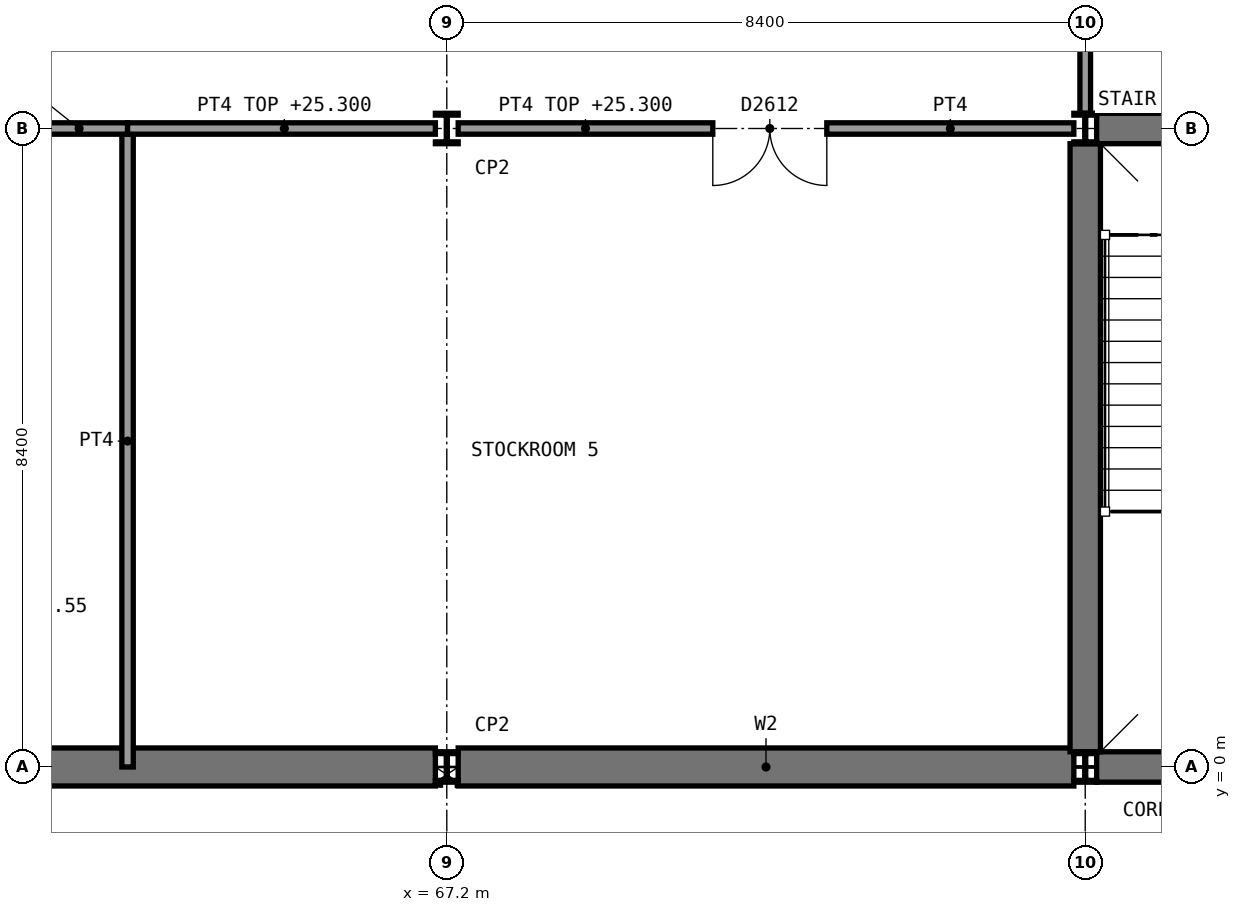
"""IFC4 building model, lengths in metres.
Left out: names, types, materials, properties, quantities, classifications, styles, units other than length and angle.
Written with IfcOpenShell. Run it as: python <this file> out.ifc"""

import sys

from ifc_helpers import new_model, si_unit, direction, frame, frame_2d, origin, origin_2d, place, context, subcontext, project, spatial, rectangle, i_section, extrude, element, fill, save


model = new_model("IFC4")
c1 = context("Model", 3, precision=1e-05, world=origin(), true_north=direction((0.0, 1.0)))
c2 = subcontext(c1, "Body", "Model", "MODEL_VIEW")
j1 = project(units=[si_unit("LENGTHUNIT", "METRE"), si_unit("PLANEANGLEUNIT", "RADIAN")], contexts=[c1])
p1 = place(None, origin())
s1 = spatial("IfcSite", under=j1, at=p1, CompositionType="ELEMENT")
p2 = place(p1, origin())
s2 = spatial("IfcBuilding", under=s1, at=p2, CompositionType="ELEMENT")
p3 = place(p2, frame((0.0, 0.0, 21.0)))
s3 = spatial("IfcBuildingStorey", under=s2, at=p3, CompositionType="ELEMENT", Elevation=21.0)
p4 = place(p3, frame((58.95, 0.0, 0.0), z_axis=(0.0, 0.0, 1.0), x_axis=(1.0, 0.0, 0.0)))
e1 = element("IfcWall", 1, at=p4, inside=s3, PredefinedType="SHEAR", context=c2, shape_type="SweptSolid", body=[
    extrude(rectangle(XDim=8.1, YDim=0.5, at=frame_2d((4.05, 0.0))), origin(), (0.0, 0.0, 1.0), 4.65),
])
p5 = place(p3, frame((67.35, 0.0, 0.0), z_axis=(0.0, 0.0, 1.0), x_axis=(1.0, 0.0, 0.0)))
e2 = element("IfcWall", 2, at=p5, inside=s3, PredefinedType="SHEAR", context=c2, shape_type="SweptSolid", body=[
    extrude(rectangle(XDim=8.1, YDim=0.5, at=frame_2d((4.05, 0.0))), origin(), (0.0, 0.0, 1.0), 4.65),
])
p6 = place(p3, frame((75.75, 0.0, 0.0), z_axis=(0.0, 0.0, 1.0), x_axis=(1.0, 0.0, 0.0)))
e3 = element("IfcWall", 3, at=p6, inside=s3, PredefinedType="SHEAR", context=c2, shape_type="SweptSolid", body=[
    extrude(rectangle(XDim=8.1, YDim=0.4, at=frame_2d((4.05, 0.0))), origin(), (0.0, 0.0, 1.0), 4.65),
])
p7 = place(p3, frame((75.75, 8.4, 0.0), z_axis=(0.0, 0.0, 1.0), x_axis=(1.0, 0.0, 0.0)))
e4 = element("IfcWall", 4, at=p7, inside=s3, PredefinedType="SHEAR", context=c2, shape_type="SweptSolid", body=[
    extrude(rectangle(XDim=8.1, YDim=0.4, at=frame_2d((4.05, 0.0))), origin(), (0.0, 0.0, 1.0), 4.65),
])
p8 = place(p7, frame((1.15, 0.0, 0.0)))
e5 = element("IfcOpeningElement", 5, at=p8, cuts=e4, PredefinedType="OPENING", context=c2, shape_type="SweptSolid", body=[
    extrude(rectangle(XDim=1.8, YDim=2.1, at=frame_2d((0.9, 1.05))), frame((0.0, 0.21, 0.0), z_axis=(0.0, -1.0, 0.0), x_axis=(1.0, 0.0, 0.0)), (0.0, 0.0, 1.0), 0.42),
])
p9 = place(p7, frame((5.3, 0.0, 0.0)))
e6 = element("IfcOpeningElement", 6, at=p9, cuts=e4, PredefinedType="OPENING", context=c2, shape_type="SweptSolid", body=[
    extrude(rectangle(XDim=1.8, YDim=2.1, at=frame_2d((0.9, 1.05))), frame((0.0, 0.21, 0.0), z_axis=(0.0, -1.0, 0.0), x_axis=(1.0, 0.0, 0.0)), (0.0, 0.0, 1.0), 0.42),
])
p10 = place(p3, frame((75.6, 0.2, 0.0), z_axis=(0.0, 0.0, 1.0), x_axis=(0.0, 1.0, 0.0)))
e7 = element("IfcWall", 7, at=p10, inside=s3, PredefinedType="SHEAR", context=c2, shape_type="SweptSolid", body=[
    extrude(rectangle(XDim=8.0, YDim=0.4, at=frame_2d((4.0, 0.0))), origin(), (0.0, 0.0, 1.0), 4.65),
])
for number, where, z_axis, x_axis in (
    (8, (67.2, 0.0, 0.0), (0.0, 0.0, 1.0), (1.0, 0.0, 0.0)),
    (9, (67.2, 8.4, 0.0), (0.0, 0.0, 1.0), (1.0, 0.0, 0.0)),
    (10, (75.6, 0.0, 0.0), (0.0, 0.0, 1.0), (1.0, 0.0, 0.0)),
    (11, (75.6, 8.4, 0.0), (0.0, 0.0, 1.0), (1.0, 0.0, 0.0)),
):
    element("IfcColumn", number, at=place(p3, frame(where, z_axis=z_axis, x_axis=x_axis)), inside=s3, PredefinedType="COLUMN", context=c2, shape_type="SweptSolid", body=[
        extrude(i_section(OverallWidth=0.3, OverallDepth=0.4, WebThickness=0.013, FlangeThickness=0.024, FilletRadius=0.027, at=origin_2d()), origin(), (0.0, 0.0, 1.0), 4.8),
    ])
p11 = place(p3, frame((63.0, 0.0, 0.0), z_axis=(0.0, 0.0, 1.0), x_axis=(0.0, 1.0, 0.0)))
e12 = element("IfcWall", 12, at=p11, inside=s3, PredefinedType="SOLIDWALL", context=c2, shape_type="SweptSolid", body=[
    extrude(rectangle(XDim=8.4, YDim=0.15, at=frame_2d((4.2, 0.0))), origin(), (0.0, 0.0, 1.0), 4.65),
])
p12 = place(p3, frame((58.95, 8.4, 0.0), z_axis=(0.0, 0.0, 1.0), x_axis=(1.0, 0.0, 0.0)))
e13 = element("IfcWall", 13, at=p12, inside=s3, PredefinedType="SOLIDWALL", context=c2, shape_type="SweptSolid", body=[
    extrude(rectangle(XDim=4.05, YDim=0.15, at=frame_2d((2.025, 0.0))), origin(), (0.0, 0.0, 1.0), 4.3),
])
p13 = place(p12, frame((1.35, 0.0, 0.0)))
e14 = element("IfcOpeningElement", 14, at=p13, cuts=e13, PredefinedType="OPENING", context=c2, shape_type="SweptSolid", body=[
    extrude(rectangle(XDim=1.5, YDim=2.1, at=frame_2d((0.75, 1.05))), frame((0.0, 0.085, 0.0), z_axis=(0.0, -1.0, 0.0), x_axis=(1.0, 0.0, 0.0)), (0.0, 0.0, 1.0), 0.17),
])
p14 = place(p3, frame((63.0, 8.4, 0.0), z_axis=(0.0, 0.0, 1.0), x_axis=(1.0, 0.0, 0.0)))
e15 = element("IfcWall", 15, at=p14, inside=s3, PredefinedType="SOLIDWALL", context=c2, shape_type="SweptSolid", body=[
    extrude(rectangle(XDim=4.05, YDim=0.15, at=frame_2d((2.025, 0.0))), origin(), (0.0, 0.0, 1.0), 4.3),
])
p15 = place(p3, frame((67.35, 8.4, 0.0), z_axis=(0.0, 0.0, 1.0), x_axis=(1.0, 0.0, 0.0)))
e16 = element("IfcWall", 16, at=p15, inside=s3, PredefinedType="SOLIDWALL", context=c2, shape_type="SweptSolid", body=[
    extrude(rectangle(XDim=8.1, YDim=0.15, at=frame_2d((4.05, 0.0))), origin(), (0.0, 0.0, 1.0), 4.3),
])
p16 = place(p15, frame((3.35, 0.0, 0.0)))
e17 = element("IfcOpeningElement", 17, at=p16, cuts=e16, PredefinedType="OPENING", context=c2, shape_type="SweptSolid", body=[
    extrude(rectangle(XDim=1.5, YDim=2.1, at=frame_2d((0.75, 1.05))), frame((0.0, 0.085, 0.0), z_axis=(0.0, -1.0, 0.0), x_axis=(1.0, 0.0, 0.0)), (0.0, 0.0, 1.0), 0.17),
])
p17 = place(p3, frame((75.6, 8.6, 0.0), z_axis=(0.0, 0.0, 1.0), x_axis=(0.0, 1.0, 0.0)))
e18 = element("IfcWall", 18, at=p17, inside=s3, PredefinedType="PARTITIONING", context=c2, shape_type="SweptSolid", body=[
    extrude(rectangle(XDim=3.1, YDim=0.14, at=frame_2d((1.55, 0.0))), origin(), (0.0, 0.0, 1.0), 4.16),
])
p18 = place(p16, frame((1.5, 0.0, 0.0), z_axis=(0.0, 0.0, 1.0), x_axis=(-1.0, 0.0, 0.0)))
e19 = element("IfcDoor", 19, at=p18, inside=s3, OperationType="DOUBLE_DOOR_SINGLE_SWING", PredefinedType="DOOR", context=c2, shape_type="SweptSolid", body=[
    extrude(rectangle(XDim=1.5, YDim=2.1, at=frame_2d((0.75, 1.05))), frame((0.0, 0.025, 0.0), z_axis=(0.0, -1.0, 0.0), x_axis=(1.0, 0.0, 0.0)), (0.0, 0.0, 1.0), 0.05),
])
fill(e17, e19)
save(model, sys.argv[1])
